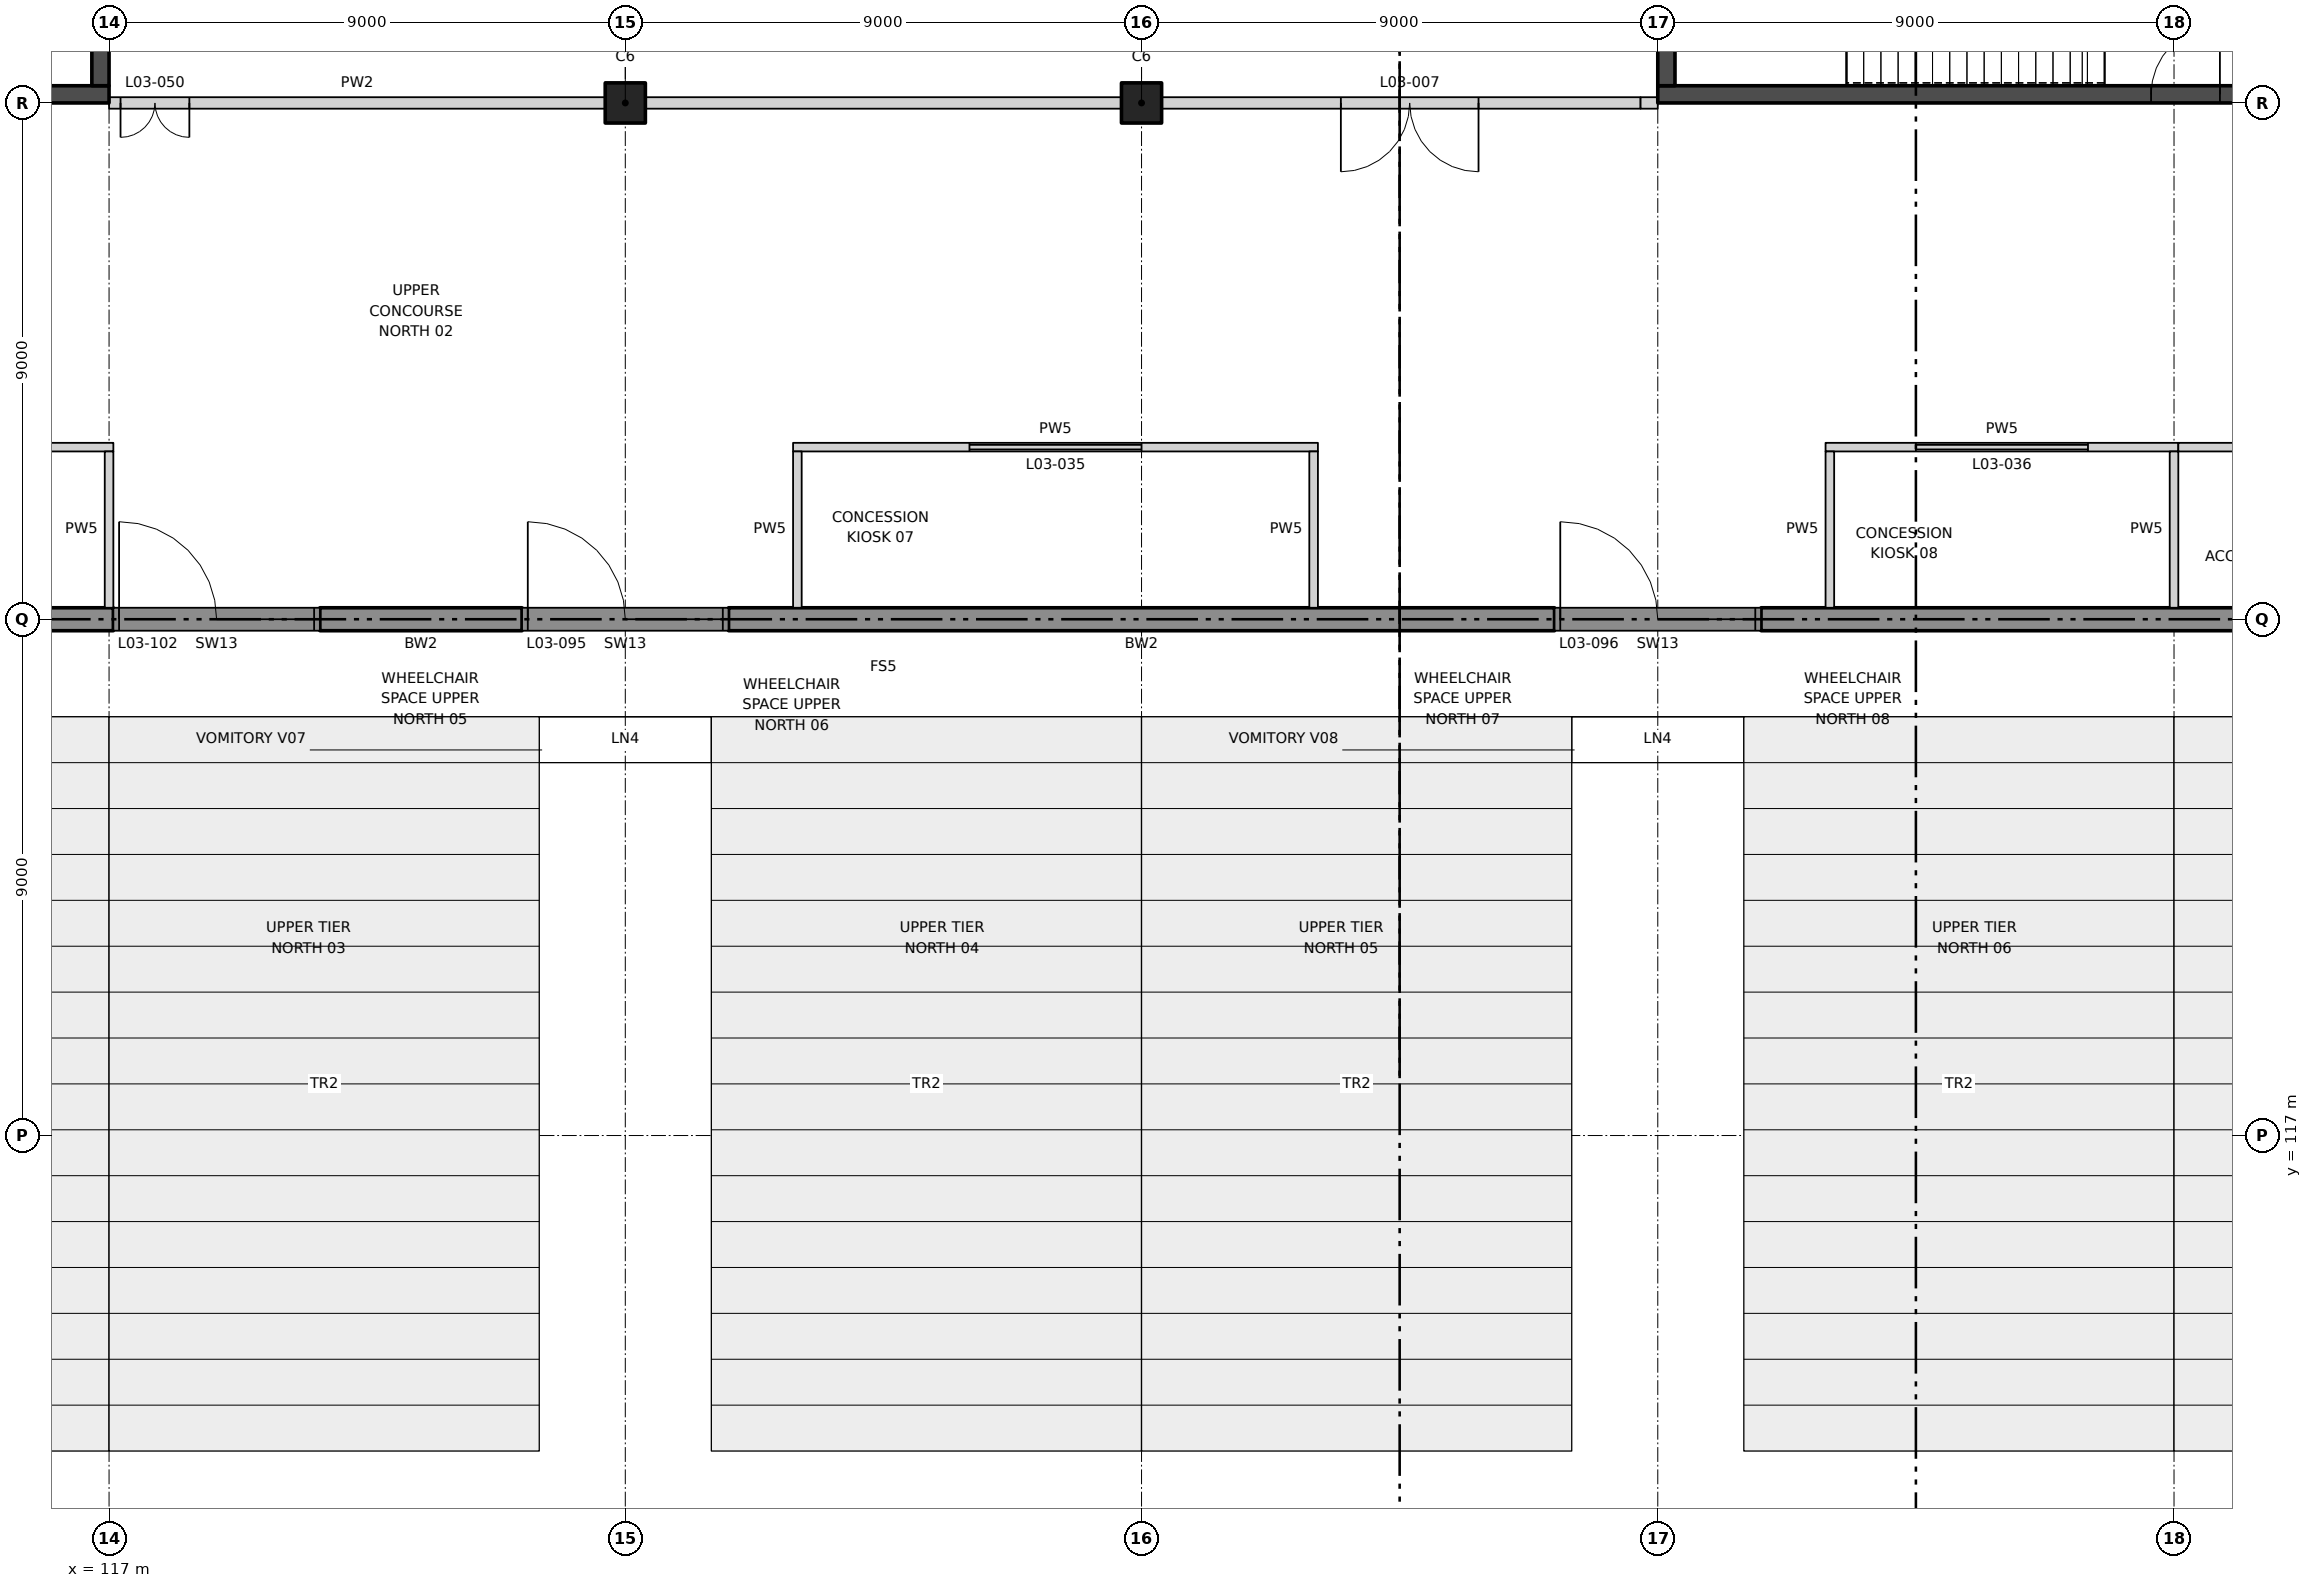
"""IFC4 building model, lengths in metres.
Left out: names, types, materials, properties, quantities, classifications, styles, units other than length and angle.
Written with IfcOpenShell. Run it as: python <this file> out.ifc"""

import sys

from ifc_helpers import new_model, si_unit, direction, frame, frame_2d, origin, origin_2d, place, context, subcontext, project, spatial, rectangle, extrude, element, fill, save


model = new_model("IFC4")
c1 = context("Model", 3, precision=1e-05, world=origin(), true_north=direction((0.0, 1.0)))
c2 = subcontext(c1, "Body", "Model", "MODEL_VIEW")
j1 = project(units=[si_unit("LENGTHUNIT", "METRE"), si_unit("PLANEANGLEUNIT", "RADIAN")], contexts=[c1])
p1 = place(None, origin())
s1 = spatial("IfcSite", under=j1, at=p1, CompositionType="ELEMENT")
p2 = place(p1, origin())
s2 = spatial("IfcBuilding", under=s1, at=p2, CompositionType="ELEMENT")
p3 = place(p2, frame((0.0, 0.0, 22.0)))
s3 = spatial("IfcBuildingStorey", under=s2, at=p3, CompositionType="ELEMENT", Elevation=22.0)
for number, where, z_axis, x_axis in (
    (1, (126.0, 135.0, 0.0), (0.0, 0.0, 1.0), (1.0, 0.0, 0.0)),
    (2, (135.0, 135.0, 0.0), (0.0, 0.0, 1.0), (1.0, 0.0, 0.0)),
):
    element("IfcColumn", number, at=place(p3, frame(where, z_axis=z_axis, x_axis=x_axis)), inside=s3, PredefinedType="COLUMN", context=c2, shape_type="SweptSolid", body=[
        extrude(rectangle(XDim=0.7, YDim=0.7, at=origin_2d()), origin(), (0.0, 0.0, 1.0), 6.0),
    ])
p4 = place(p3, frame((171.0, 126.0, 0.0), z_axis=(0.0, 0.0, 1.0), x_axis=(-1.0, 0.0, 0.0)))
e3 = element("IfcWall", 3, at=p4, inside=s3, PredefinedType="SOLIDWALL", context=c2, shape_type="SweptSolid", body=[
    extrude(rectangle(XDim=25.2, YDim=0.4, at=frame_2d((12.6, 0.0))), origin(), (0.0, 0.0, 1.0), 6.0),
])
p5 = place(p3, frame((142.2, 126.0, 0.0), z_axis=(0.0, 0.0, 1.0), x_axis=(-1.0, 0.0, 0.0)))
e4 = element("IfcWall", 4, at=p5, inside=s3, PredefinedType="SOLIDWALL", context=c2, shape_type="SweptSolid", body=[
    extrude(rectangle(XDim=14.4, YDim=0.4, at=frame_2d((7.2, 0.0))), origin(), (0.0, 0.0, 1.0), 6.0),
])
p6 = place(p3, frame((124.2, 126.0, 0.0), z_axis=(0.0, 0.0, 1.0), x_axis=(-1.0, 0.0, 0.0)))
e5 = element("IfcWall", 5, at=p6, inside=s3, PredefinedType="SOLIDWALL", context=c2, shape_type="SweptSolid", body=[
    extrude(rectangle(XDim=3.525, YDim=0.4, at=frame_2d((1.762, 0.0))), origin(), (0.0, 0.0, 1.0), 6.0),
])
p7 = place(p3, frame((117.075, 126.0, 0.0), z_axis=(0.0, 0.0, 1.0), x_axis=(-1.0, 0.0, 0.0)))
e6 = element("IfcWall", 6, at=p7, inside=s3, PredefinedType="SOLIDWALL", context=c2, shape_type="SweptSolid", body=[
    extrude(rectangle(XDim=11.775, YDim=0.4, at=frame_2d((5.887, 0.0))), origin(), (0.0, 0.0, 1.0), 6.0),
])
p8 = place(p3, frame((107.925, 129.0, 0.0), z_axis=(0.0, 0.0, 1.0), x_axis=(1.0, 0.0, 0.0)))
e7 = element("IfcWall", 7, at=p8, inside=s3, PredefinedType="PARTITIONING", context=c2, shape_type="SweptSolid", body=[
    extrude(rectangle(XDim=9.15, YDim=0.15, at=frame_2d((4.575, 0.0))), origin(), (0.0, 0.0, 1.0), 6.0),
])
p9 = place(p8, frame((3.075, 0.0, 0.0)))
e8 = element("IfcOpeningElement", 8, at=p9, cuts=e7, PredefinedType="OPENING", context=c2, shape_type="SweptSolid", body=[
    extrude(rectangle(XDim=3.0, YDim=2.4, at=frame_2d((1.5, 1.2))), frame((0.0, 0.085, 0.0), z_axis=(0.0, -1.0, 0.0), x_axis=(1.0, 0.0, 0.0)), (0.0, 0.0, 1.0), 0.17),
])
p10 = place(p3, frame((128.925, 129.0, 0.0), z_axis=(0.0, 0.0, 1.0), x_axis=(1.0, 0.0, 0.0)))
e9 = element("IfcWall", 9, at=p10, inside=s3, PredefinedType="PARTITIONING", context=c2, shape_type="SweptSolid", body=[
    extrude(rectangle(XDim=9.15, YDim=0.15, at=frame_2d((4.575, 0.0))), origin(), (0.0, 0.0, 1.0), 6.0),
])
p11 = place(p10, frame((3.075, 0.0, 0.0)))
e10 = element("IfcOpeningElement", 10, at=p11, cuts=e9, PredefinedType="OPENING", context=c2, shape_type="SweptSolid", body=[
    extrude(rectangle(XDim=3.0, YDim=2.4, at=frame_2d((1.5, 1.2))), frame((0.0, 0.085, 0.0), z_axis=(0.0, -1.0, 0.0), x_axis=(1.0, 0.0, 0.0)), (0.0, 0.0, 1.0), 0.17),
])
p12 = place(p3, frame((146.925, 129.0, 0.0), z_axis=(0.0, 0.0, 1.0), x_axis=(1.0, 0.0, 0.0)))
e11 = element("IfcWall", 11, at=p12, inside=s3, PredefinedType="PARTITIONING", context=c2, shape_type="SweptSolid", body=[
    extrude(rectangle(XDim=6.15, YDim=0.15, at=frame_2d((3.075, 0.0))), origin(), (0.0, 0.0, 1.0), 6.0),
])
p13 = place(p12, frame((1.575, 0.0, 0.0)))
e12 = element("IfcOpeningElement", 12, at=p13, cuts=e11, PredefinedType="OPENING", context=c2, shape_type="SweptSolid", body=[
    extrude(rectangle(XDim=3.0, YDim=2.4, at=frame_2d((1.5, 1.2))), frame((0.0, 0.085, 0.0), z_axis=(0.0, -1.0, 0.0), x_axis=(1.0, 0.0, 0.0)), (0.0, 0.0, 1.0), 0.17),
])
p14 = place(p3, frame((153.075, 129.0, 0.0), z_axis=(0.0, 0.0, 1.0), x_axis=(1.0, 0.0, 0.0)))
e13 = element("IfcWall", 13, at=p14, inside=s3, PredefinedType="PARTITIONING", context=c2, shape_type="SweptSolid", body=[
    extrude(rectangle(XDim=3.0, YDim=0.15, at=frame_2d((1.5, 0.0))), origin(), (0.0, 0.0, 1.0), 6.0),
])
p15 = place(p14, frame((1.0, 0.0, 0.0)))
e14 = element("IfcOpeningElement", 14, at=p15, cuts=e13, PredefinedType="OPENING", context=c2, shape_type="SweptSolid", body=[
    extrude(rectangle(XDim=1.0, YDim=2.1, at=frame_2d((0.5, 1.05))), frame((0.0, 0.085, 0.0), z_axis=(0.0, -1.0, 0.0), x_axis=(1.0, 0.0, 0.0)), (0.0, 0.0, 1.0), 0.17),
])
p16 = place(p3, frame((135.35, 135.0, 0.0), z_axis=(0.0, 0.0, 1.0), x_axis=(1.0, 0.0, 0.0)))
e15 = element("IfcWall", 15, at=p16, inside=s3, PredefinedType="PARTITIONING", context=c2, shape_type="SweptSolid", body=[
    extrude(rectangle(XDim=8.35, YDim=0.2, at=frame_2d((4.175, 0.0))), origin(), (0.0, 0.0, 1.0), 4.8),
])
p17 = place(p16, frame((3.125, 0.0, 0.0)))
e16 = element("IfcOpeningElement", 16, at=p17, cuts=e15, PredefinedType="OPENING", context=c2, shape_type="SweptSolid", body=[
    extrude(rectangle(XDim=2.4, YDim=2.4, at=frame_2d((1.2, 1.2))), frame((0.0, 0.11, 0.0), z_axis=(0.0, -1.0, 0.0), x_axis=(1.0, 0.0, 0.0)), (0.0, 0.0, 1.0), 0.22),
])
p18 = place(p3, frame((126.35, 135.0, 0.0), z_axis=(0.0, 0.0, 1.0), x_axis=(1.0, 0.0, 0.0)))
e17 = element("IfcWall", 17, at=p18, inside=s3, PredefinedType="PARTITIONING", context=c2, shape_type="SweptSolid", body=[
    extrude(rectangle(XDim=8.3, YDim=0.2, at=frame_2d((4.15, 0.0))), origin(), (0.0, 0.0, 1.0), 4.8),
])
p19 = place(p3, frame((117.0, 135.0, 0.0), z_axis=(0.0, 0.0, 1.0), x_axis=(1.0, 0.0, 0.0)))
e18 = element("IfcWall", 18, at=p19, inside=s3, PredefinedType="PARTITIONING", context=c2, shape_type="SweptSolid", body=[
    extrude(rectangle(XDim=8.65, YDim=0.2, at=frame_2d((4.325, 0.0))), origin(), (0.0, 0.0, 1.0), 4.8),
])
p20 = place(p19, frame((0.2, 0.0, 0.0)))
e19 = element("IfcOpeningElement", 19, at=p20, cuts=e18, PredefinedType="OPENING", context=c2, shape_type="SweptSolid", body=[
    extrude(rectangle(XDim=1.2, YDim=2.1, at=frame_2d((0.6, 1.05))), frame((0.0, 0.11, 0.0), z_axis=(0.0, -1.0, 0.0), x_axis=(1.0, 0.0, 0.0)), (0.0, 0.0, 1.0), 0.22),
])
p21 = place(p3, frame((117.0, 126.2, 0.0), z_axis=(0.0, 0.0, 1.0), x_axis=(0.0, 1.0, 0.0)))
e20 = element("IfcWall", 20, at=p21, inside=s3, PredefinedType="PARTITIONING", context=c2, shape_type="SweptSolid", body=[
    extrude(rectangle(XDim=2.725, YDim=0.15, at=frame_2d((1.363, 0.0))), origin(), (0.0, 0.0, 1.0), 4.7),
])
for number, where, z_axis, x_axis in (
    (21, (129.0, 126.2, 0.0), (0.0, 0.0, 1.0), (0.0, 1.0, 0.0)),
    (22, (138.0, 126.2, 0.0), (0.0, 0.0, 1.0), (0.0, 1.0, 0.0)),
    (23, (147.0, 126.2, 0.0), (0.0, 0.0, 1.0), (0.0, 1.0, 0.0)),
):
    element("IfcWall", number, at=place(p3, frame(where, z_axis=z_axis, x_axis=x_axis)), inside=s3, PredefinedType="PARTITIONING", context=c2, shape_type="SweptSolid", body=[
        extrude(rectangle(XDim=2.725, YDim=0.15, at=frame_2d((1.363, 0.0))), origin(), (0.0, 0.0, 1.0), 6.0),
    ])
p22 = place(p3, frame((153.0, 126.2, 0.0), z_axis=(0.0, 0.0, 1.0), x_axis=(0.0, 1.0, 0.0)))
e24 = element("IfcWall", 24, at=p22, inside=s3, PredefinedType="PARTITIONING", context=c2, shape_type="SweptSolid", body=[
    extrude(rectangle(XDim=2.725, YDim=0.15, at=frame_2d((1.363, 0.0))), origin(), (0.0, 0.0, 1.0), 4.7),
])
p23 = place(p3, frame((117.0, 135.15, 0.0), z_axis=(0.0, 0.0, 1.0), x_axis=(-1.0, 0.0, 0.0)))
e25 = element("IfcWall", 25, at=p23, inside=s3, PredefinedType="SHEAR", context=c2, shape_type="SweptSolid", body=[
    extrude(rectangle(XDim=18.0, YDim=0.3, at=frame_2d((9.0, 0.0))), origin(), (0.0, 0.0, 1.0), 6.0),
])
p24 = place(p23, frame((8.6, 0.0, 0.0)))
e26 = element("IfcOpeningElement", 26, at=p24, cuts=e25, PredefinedType="OPENING", context=c2, shape_type="SweptSolid", body=[
    extrude(rectangle(XDim=1.2, YDim=2.1, at=frame_2d((0.6, 1.05))), frame((0.0, 0.16, 0.0), z_axis=(0.0, -1.0, 0.0), x_axis=(1.0, 0.0, 0.0)), (0.0, 0.0, 1.0), 0.32),
])
p25 = place(p3, frame((116.85, 135.3, 0.0), z_axis=(0.0, 0.0, 1.0), x_axis=(0.0, 1.0, 0.0)))
e27 = element("IfcWall", 27, at=p25, inside=s3, PredefinedType="SHEAR", context=c2, shape_type="SweptSolid", body=[
    extrude(rectangle(XDim=8.7, YDim=0.3, at=frame_2d((4.35, 0.0))), origin(), (0.0, 0.0, 1.0), 6.0),
])
p26 = place(p3, frame((144.0, 135.15, 0.0), z_axis=(0.0, 0.0, 1.0), x_axis=(1.0, 0.0, 0.0)))
e28 = element("IfcWall", 28, at=p26, inside=s3, PredefinedType="SHEAR", context=c2, shape_type="SweptSolid", body=[
    extrude(rectangle(XDim=18.0, YDim=0.3, at=frame_2d((9.0, 0.0))), origin(), (0.0, 0.0, 1.0), 6.0),
])
p27 = place(p26, frame((8.6, 0.0, 0.0)))
e29 = element("IfcOpeningElement", 29, at=p27, cuts=e28, PredefinedType="OPENING", context=c2, shape_type="SweptSolid", body=[
    extrude(rectangle(XDim=1.2, YDim=2.1, at=frame_2d((0.6, 1.05))), frame((0.0, 0.16, 0.0), z_axis=(0.0, -1.0, 0.0), x_axis=(1.0, 0.0, 0.0)), (0.0, 0.0, 1.0), 0.32),
])
p28 = place(p3, frame((144.15, 135.3, 0.0), z_axis=(0.0, 0.0, 1.0), x_axis=(0.0, 1.0, 0.0)))
e30 = element("IfcWall", 30, at=p28, inside=s3, PredefinedType="SHEAR", context=c2, shape_type="SweptSolid", body=[
    extrude(rectangle(XDim=8.7, YDim=0.3, at=frame_2d((4.35, 0.0))), origin(), (0.0, 0.0, 1.0), 6.0),
])
p29 = place(p3, frame((124.2, 126.0, 0.0), z_axis=(0.0, 0.0, 1.0), x_axis=(1.0, 0.0, 0.0)))
e31 = element("IfcWall", 31, at=p29, inside=s3, PredefinedType="SOLIDWALL", context=c2, shape_type="SweptSolid", body=[
    extrude(rectangle(XDim=3.6, YDim=0.4, at=frame_2d((1.8, 0.0))), origin(), (0.0, 0.0, 1.0), 3.0),
])
p30 = place(p29, frame((0.1, 0.0, 0.0)))
e32 = element("IfcOpeningElement", 32, at=p30, cuts=e31, PredefinedType="OPENING", context=c2, shape_type="SweptSolid", body=[
    extrude(rectangle(XDim=3.4, YDim=2.4, at=frame_2d((1.7, 1.2))), frame((0.0, 0.21, 0.0), z_axis=(0.0, -1.0, 0.0), x_axis=(1.0, 0.0, 0.0)), (0.0, 0.0, 1.0), 0.42),
])
p31 = place(p3, frame((142.2, 126.0, 0.0), z_axis=(0.0, 0.0, 1.0), x_axis=(1.0, 0.0, 0.0)))
e33 = element("IfcWall", 33, at=p31, inside=s3, PredefinedType="SOLIDWALL", context=c2, shape_type="SweptSolid", body=[
    extrude(rectangle(XDim=3.6, YDim=0.4, at=frame_2d((1.8, 0.0))), origin(), (0.0, 0.0, 1.0), 3.0),
])
p32 = place(p31, frame((0.1, 0.0, 0.0)))
e34 = element("IfcOpeningElement", 34, at=p32, cuts=e33, PredefinedType="OPENING", context=c2, shape_type="SweptSolid", body=[
    extrude(rectangle(XDim=3.4, YDim=2.4, at=frame_2d((1.7, 1.2))), frame((0.0, 0.21, 0.0), z_axis=(0.0, -1.0, 0.0), x_axis=(1.0, 0.0, 0.0)), (0.0, 0.0, 1.0), 0.42),
])
p33 = place(p3, frame((117.075, 126.0, 0.0), z_axis=(0.0, 0.0, 1.0), x_axis=(1.0, 0.0, 0.0)))
e35 = element("IfcWall", 35, at=p33, inside=s3, PredefinedType="SOLIDWALL", context=c2, shape_type="SweptSolid", body=[
    extrude(rectangle(XDim=3.6, YDim=0.4, at=frame_2d((1.8, 0.0))), origin(), (0.0, 0.0, 1.0), 3.0),
])
p34 = place(p33, frame((0.1, 0.0, 0.0)))
e36 = element("IfcOpeningElement", 36, at=p34, cuts=e35, PredefinedType="OPENING", context=c2, shape_type="SweptSolid", body=[
    extrude(rectangle(XDim=3.4, YDim=2.4, at=frame_2d((1.7, 1.2))), frame((0.0, 0.21, 0.0), z_axis=(0.0, -1.0, 0.0), x_axis=(1.0, 0.0, 0.0)), (0.0, 0.0, 1.0), 0.42),
])
p35 = place(p3, frame((143.7, 135.0, 0.0), z_axis=(0.0, 0.0, 1.0), x_axis=(1.0, 0.0, 0.0)))
e37 = element("IfcWall", 37, at=p35, inside=s3, PredefinedType="PARTITIONING", context=c2, shape_type="SweptSolid", body=[
    extrude(rectangle(XDim=0.3, YDim=0.2, at=frame_2d((0.15, 0.0))), origin(), (0.0, 0.0, 1.0), 6.0),
])
p36 = place(p17, frame((2.4, 0.0, 0.0), z_axis=(0.0, 0.0, 1.0), x_axis=(-1.0, 0.0, 0.0)))
e38 = element("IfcDoor", 38, at=p36, inside=s3, OperationType="DOUBLE_DOOR_DOUBLE_SWING", PredefinedType="DOOR", context=c2, shape_type="SweptSolid", body=[
    extrude(rectangle(XDim=2.4, YDim=2.4, at=frame_2d((1.2, 1.2))), frame((0.0, 0.025, 0.0), z_axis=(0.0, -1.0, 0.0), x_axis=(1.0, 0.0, 0.0)), (0.0, 0.0, 1.0), 0.05),
])
fill(e16, e38)
p37 = place(p11, origin())
e39 = element("IfcDoor", 39, at=p37, inside=s3, OperationType="ROLLINGUP", PredefinedType="DOOR", context=c2, shape_type="SweptSolid", body=[
    extrude(rectangle(XDim=3.0, YDim=2.4, at=frame_2d((1.5, 1.2))), frame((0.0, 0.025, 0.0), z_axis=(0.0, -1.0, 0.0), x_axis=(1.0, 0.0, 0.0)), (0.0, 0.0, 1.0), 0.05),
])
fill(e10, e39)
p38 = place(p13, origin())
e40 = element("IfcDoor", 40, at=p38, inside=s3, OperationType="ROLLINGUP", PredefinedType="DOOR", context=c2, shape_type="SweptSolid", body=[
    extrude(rectangle(XDim=3.0, YDim=2.4, at=frame_2d((1.5, 1.2))), frame((0.0, 0.025, 0.0), z_axis=(0.0, -1.0, 0.0), x_axis=(1.0, 0.0, 0.0)), (0.0, 0.0, 1.0), 0.05),
])
fill(e12, e40)
p39 = place(p20, frame((1.2, 0.0, 0.0), z_axis=(0.0, 0.0, 1.0), x_axis=(-1.0, 0.0, 0.0)))
e41 = element("IfcDoor", 41, at=p39, inside=s3, OperationType="DOUBLE_DOOR_DOUBLE_SWING", PredefinedType="DOOR", context=c2, shape_type="SweptSolid", body=[
    extrude(rectangle(XDim=1.2, YDim=2.1, at=frame_2d((0.6, 1.05))), frame((0.0, 0.025, 0.0), z_axis=(0.0, -1.0, 0.0), x_axis=(1.0, 0.0, 0.0)), (0.0, 0.0, 1.0), 0.05),
])
fill(e19, e41)
p40 = place(p27, origin())
e42 = element("IfcDoor", 42, at=p40, inside=s3, OperationType="SINGLE_SWING_RIGHT", PredefinedType="DOOR", context=c2, shape_type="SweptSolid", body=[
    extrude(rectangle(XDim=1.2, YDim=2.1, at=frame_2d((0.6, 1.05))), frame((0.0, 0.025, 0.0), z_axis=(0.0, -1.0, 0.0), x_axis=(1.0, 0.0, 0.0)), (0.0, 0.0, 1.0), 0.05),
])
fill(e29, e42)
p41 = place(p30, origin())
e43 = element("IfcDoor", 43, at=p41, inside=s3, OperationType="DOUBLE_DOOR_SINGLE_SWING", PredefinedType="DOOR", context=c2, shape_type="SweptSolid", body=[
    extrude(rectangle(XDim=3.4, YDim=2.4, at=frame_2d((1.7, 1.2))), frame((0.0, 0.025, 0.0), z_axis=(0.0, -1.0, 0.0), x_axis=(1.0, 0.0, 0.0)), (0.0, 0.0, 1.0), 0.05),
])
fill(e32, e43)
p42 = place(p32, origin())
e44 = element("IfcDoor", 44, at=p42, inside=s3, OperationType="DOUBLE_DOOR_SINGLE_SWING", PredefinedType="DOOR", context=c2, shape_type="SweptSolid", body=[
    extrude(rectangle(XDim=3.4, YDim=2.4, at=frame_2d((1.7, 1.2))), frame((0.0, 0.025, 0.0), z_axis=(0.0, -1.0, 0.0), x_axis=(1.0, 0.0, 0.0)), (0.0, 0.0, 1.0), 0.05),
])
fill(e34, e44)
p43 = place(p34, origin())
e45 = element("IfcDoor", 45, at=p43, inside=s3, OperationType="DOUBLE_DOOR_SINGLE_SWING", PredefinedType="DOOR", context=c2, shape_type="SweptSolid", body=[
    extrude(rectangle(XDim=3.4, YDim=2.4, at=frame_2d((1.7, 1.2))), frame((0.0, 0.025, 0.0), z_axis=(0.0, -1.0, 0.0), x_axis=(1.0, 0.0, 0.0)), (0.0, 0.0, 1.0), 0.05),
])
fill(e36, e45)
save(model, sys.argv[1])
